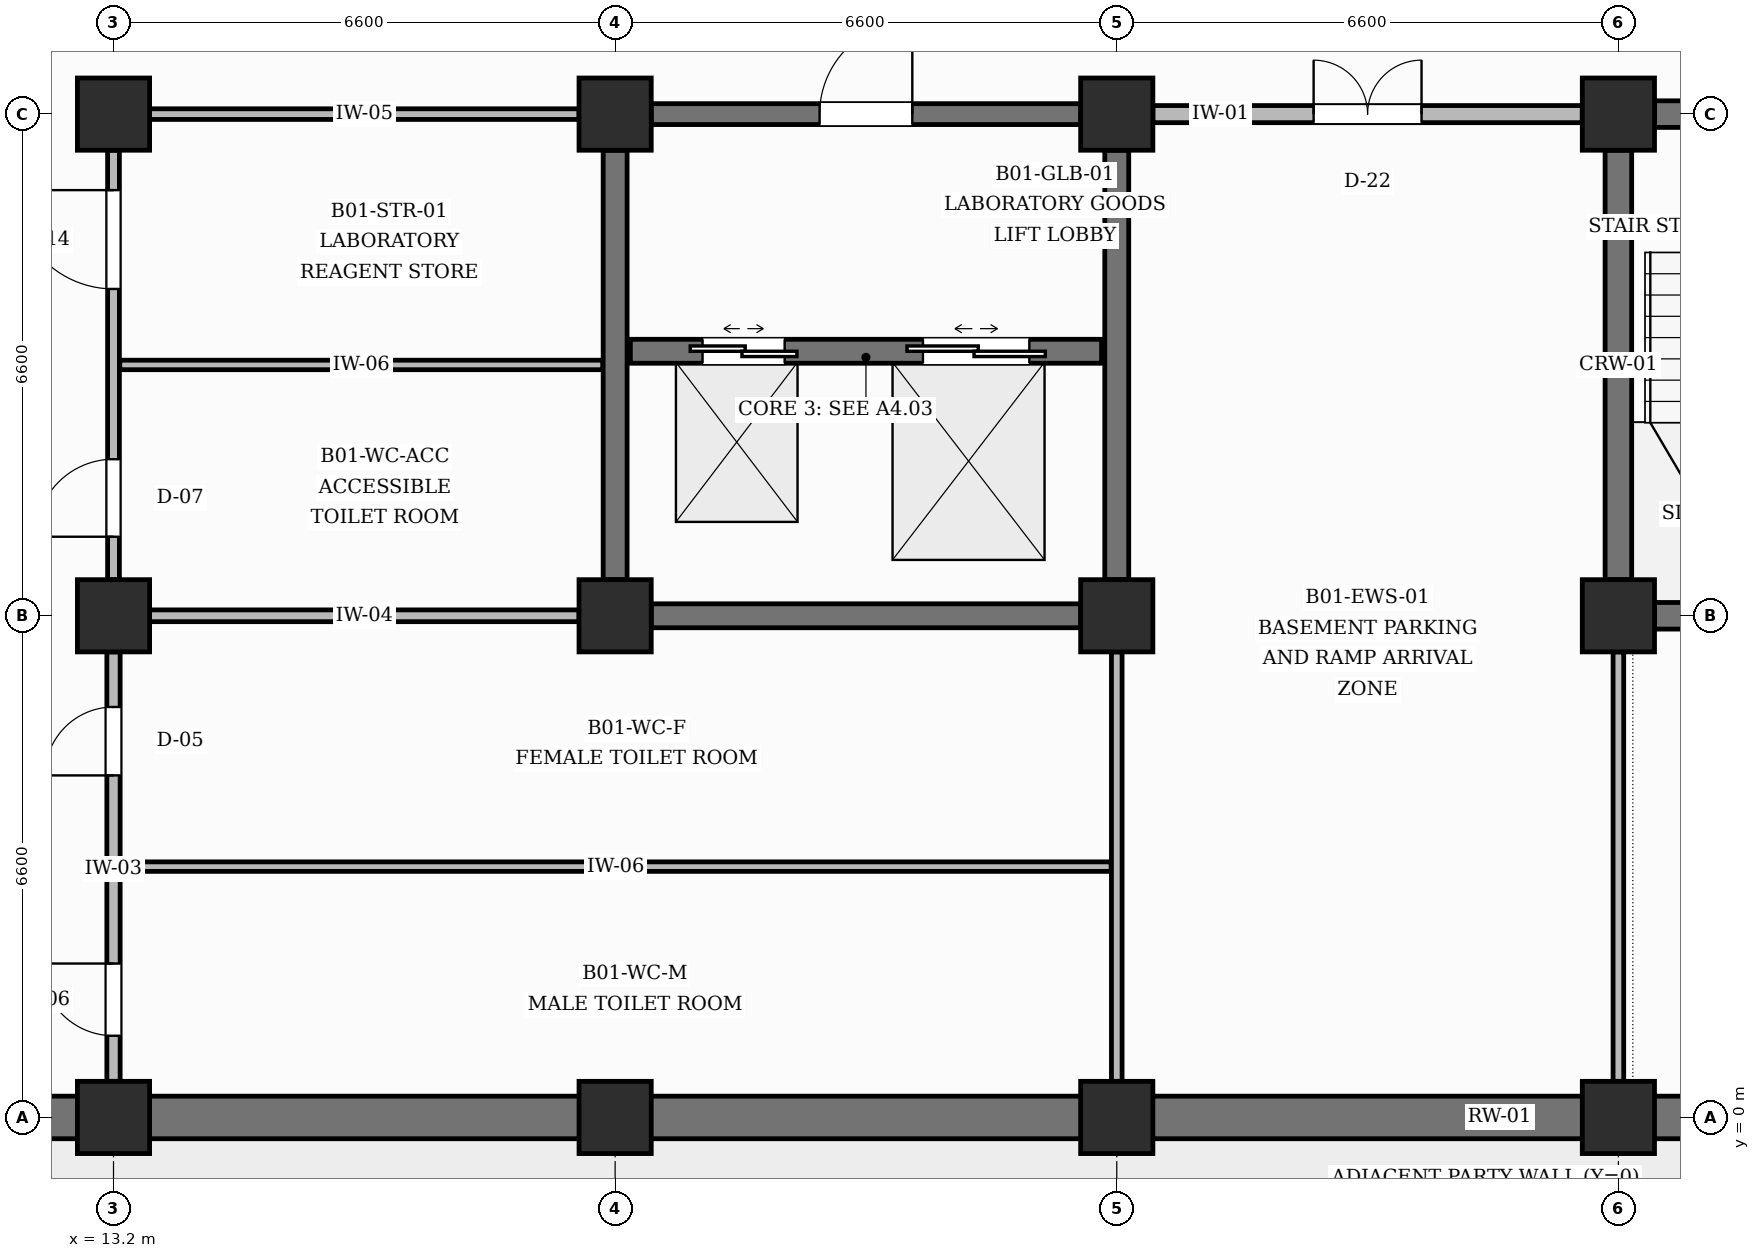
"""IFC4 building model, lengths in metres.
Left out: names, types, materials, properties, quantities, classifications, styles, units other than length and angle.
Written with IfcOpenShell. Run it as: python <this file> out.ifc"""

import sys

from ifc_helpers import new_model, si_unit, direction, frame, frame_2d, origin, origin_2d, place, context, subcontext, project, spatial, rectangle, extrude, element, fill, save


model = new_model("IFC4")
c1 = context("Model", 3, precision=1e-05, world=origin(), true_north=direction((0.0, 1.0)))
c2 = subcontext(c1, "Body", "Model", "MODEL_VIEW")
j1 = project(units=[si_unit("LENGTHUNIT", "METRE"), si_unit("PLANEANGLEUNIT", "RADIAN")], contexts=[c1])
p1 = place(None, origin())
s1 = spatial("IfcSite", under=j1, at=p1, CompositionType="ELEMENT")
p2 = place(p1, origin())
s2 = spatial("IfcBuilding", under=s1, at=p2, CompositionType="ELEMENT")
p3 = place(p2, frame((0.0, 0.0, -4.5)))
s3 = spatial("IfcBuildingStorey", under=s2, at=p3, CompositionType="ELEMENT", Elevation=-4.5)
for number, where, z_axis, x_axis in (
    (1, (13.2, 0.0, 0.0), (0.0, 0.0, 1.0), (1.0, 0.0, 0.0)),
    (2, (13.2, 6.6, 0.0), (0.0, 0.0, 1.0), (1.0, 0.0, 0.0)),
    (3, (13.2, 13.2, 0.0), (0.0, 0.0, 1.0), (1.0, 0.0, 0.0)),
    (4, (19.8, 0.0, 0.0), (0.0, 0.0, 1.0), (1.0, 0.0, 0.0)),
    (5, (19.8, 6.6, 0.0), (0.0, 0.0, 1.0), (1.0, 0.0, 0.0)),
    (6, (19.8, 13.2, 0.0), (0.0, 0.0, 1.0), (1.0, 0.0, 0.0)),
    (7, (26.4, 0.0, 0.0), (0.0, 0.0, 1.0), (1.0, 0.0, 0.0)),
    (8, (26.4, 6.6, 0.0), (0.0, 0.0, 1.0), (1.0, 0.0, 0.0)),
    (9, (26.4, 13.2, 0.0), (0.0, 0.0, 1.0), (1.0, 0.0, 0.0)),
    (10, (33.0, 0.0, 0.0), (0.0, 0.0, 1.0), (1.0, 0.0, 0.0)),
    (11, (33.0, 6.6, 0.0), (0.0, 0.0, 1.0), (1.0, 0.0, 0.0)),
    (12, (33.0, 13.2, 0.0), (0.0, 0.0, 1.0), (1.0, 0.0, 0.0)),
):
    element("IfcColumn", number, at=place(p3, frame(where, z_axis=z_axis, x_axis=x_axis)), inside=s3, PredefinedType="COLUMN", context=c2, shape_type="SweptSolid", body=[
        extrude(rectangle(XDim=0.95, YDim=0.95, at=origin_2d()), origin(), (0.0, 0.0, 1.0), 4.5),
    ])
p4 = place(p3, frame((7.075, 0.0, 0.0), z_axis=(0.0, 0.0, 1.0), x_axis=(1.0, 0.0, 0.0)))
e13 = element("IfcWall", 13, at=p4, inside=s3, PredefinedType="USERDEFINED", context=c2, shape_type="SweptSolid", body=[
    extrude(rectangle(XDim=5.65, YDim=0.56, at=frame_2d((2.825, 0.0))), origin(), (0.0, 0.0, 1.0), 3.49),
])
p5 = place(p3, frame((13.675, 0.0, 0.0), z_axis=(0.0, 0.0, 1.0), x_axis=(1.0, 0.0, 0.0)))
e14 = element("IfcWall", 14, at=p5, inside=s3, PredefinedType="USERDEFINED", context=c2, shape_type="SweptSolid", body=[
    extrude(rectangle(XDim=5.65, YDim=0.56, at=frame_2d((2.825, 0.0))), origin(), (0.0, 0.0, 1.0), 3.49),
])
p6 = place(p3, frame((20.275, 0.0, 0.0), z_axis=(0.0, 0.0, 1.0), x_axis=(1.0, 0.0, 0.0)))
e15 = element("IfcWall", 15, at=p6, inside=s3, PredefinedType="USERDEFINED", context=c2, shape_type="SweptSolid", body=[
    extrude(rectangle(XDim=5.65, YDim=0.56, at=frame_2d((2.825, 0.0))), origin(), (0.0, 0.0, 1.0), 3.49),
])
p7 = place(p3, frame((26.875, 0.0, 0.0), z_axis=(0.0, 0.0, 1.0), x_axis=(1.0, 0.0, 0.0)))
e16 = element("IfcWall", 16, at=p7, inside=s3, PredefinedType="USERDEFINED", context=c2, shape_type="SweptSolid", body=[
    extrude(rectangle(XDim=5.65, YDim=0.56, at=frame_2d((2.825, 0.0))), origin(), (0.0, 0.0, 1.0), 3.49),
])
p8 = place(p3, frame((33.475, 0.0, 0.0), z_axis=(0.0, 0.0, 1.0), x_axis=(1.0, 0.0, 0.0)))
e17 = element("IfcWall", 17, at=p8, inside=s3, PredefinedType="USERDEFINED", context=c2, shape_type="SweptSolid", body=[
    extrude(rectangle(XDim=5.675, YDim=0.56, at=frame_2d((2.837, 0.0))), origin(), (0.0, 0.0, 1.0), 3.49),
])
p9 = place(p3, frame((33.475, 6.6, 0.0), z_axis=(0.0, 0.0, 1.0), x_axis=(1.0, 0.0, 0.0)))
e18 = element("IfcWall", 18, at=p9, inside=s3, PredefinedType="SHEAR", context=c2, shape_type="SweptSolid", body=[
    extrude(rectangle(XDim=5.675, YDim=0.35, at=frame_2d((2.837, 0.0))), origin(), (0.0, 0.0, 1.0), 3.24),
])
p10 = place(p3, frame((33.475, 13.2, 0.0), z_axis=(0.0, 0.0, 1.0), x_axis=(1.0, 0.0, 0.0)))
e19 = element("IfcWall", 19, at=p10, inside=s3, PredefinedType="SHEAR", context=c2, shape_type="SweptSolid", body=[
    extrude(rectangle(XDim=5.675, YDim=0.35, at=frame_2d((2.837, 0.0))), origin(), (0.0, 0.0, 1.0), 3.34),
])
p11 = place(p10, frame((2.288, 0.0, 0.0)))
e20 = element("IfcOpeningElement", 20, at=p11, cuts=e19, PredefinedType="OPENING", context=c2, shape_type="SweptSolid", body=[
    extrude(rectangle(XDim=1.1, YDim=2.15, at=frame_2d((0.55, 1.075))), frame((0.0, 0.185, 0.0), z_axis=(0.0, -1.0, 0.0), x_axis=(1.0, 0.0, 0.0)), (0.0, 0.0, 1.0), 0.37),
])
p12 = place(p3, frame((33.0, 7.075, 0.0), z_axis=(0.0, 0.0, 1.0), x_axis=(0.0, 1.0, 0.0)))
e21 = element("IfcWall", 21, at=p12, inside=s3, PredefinedType="SHEAR", context=c2, shape_type="SweptSolid", body=[
    extrude(rectangle(XDim=5.65, YDim=0.35, at=frame_2d((2.825, 0.0))), origin(), (0.0, 0.0, 1.0), 3.34),
])
p13 = place(p3, frame((20.275, 6.6, 0.0), z_axis=(0.0, 0.0, 1.0), x_axis=(1.0, 0.0, 0.0)))
e22 = element("IfcWall", 22, at=p13, inside=s3, PredefinedType="SHEAR", context=c2, shape_type="SweptSolid", body=[
    extrude(rectangle(XDim=5.65, YDim=0.315, at=frame_2d((2.825, 0.0))), origin(), (0.0, 0.0, 1.0), 3.24),
])
for number, where, z_axis, x_axis in (
    (23, (19.8, 7.075, 0.0), (0.0, 0.0, 1.0), (0.0, 1.0, 0.0)),
    (24, (26.4, 7.075, 0.0), (0.0, 0.0, 1.0), (0.0, 1.0, 0.0)),
):
    element("IfcWall", number, at=place(p3, frame(where, z_axis=z_axis, x_axis=x_axis)), inside=s3, PredefinedType="SHEAR", context=c2, shape_type="SweptSolid", body=[
        extrude(rectangle(XDim=5.65, YDim=0.315, at=frame_2d((2.825, 0.0))), origin(), (0.0, 0.0, 1.0), 3.34),
    ])
p14 = place(p3, frame((20.275, 13.2, 0.0), z_axis=(0.0, 0.0, 1.0), x_axis=(1.0, 0.0, 0.0)))
e25 = element("IfcWall", 25, at=p14, inside=s3, PredefinedType="SHEAR", context=c2, shape_type="SweptSolid", body=[
    extrude(rectangle(XDim=5.65, YDim=0.275, at=frame_2d((2.825, 0.0))), origin(), (0.0, 0.0, 1.0), 3.34),
])
p15 = place(p14, frame((2.215, 0.0, 0.0)))
e26 = element("IfcOpeningElement", 26, at=p15, cuts=e25, PredefinedType="OPENING", context=c2, shape_type="SweptSolid", body=[
    extrude(rectangle(XDim=1.22, YDim=2.15, at=frame_2d((0.61, 1.075))), frame((0.0, 0.147, 0.0), z_axis=(0.0, -1.0, 0.0), x_axis=(1.0, 0.0, 0.0)), (0.0, 0.0, 1.0), 0.295),
])
p16 = place(p3, frame((20.0, 10.08, 0.0), z_axis=(0.0, 0.0, 1.0), x_axis=(1.0, 0.0, 0.0)))
e27 = element("IfcWall", 27, at=p16, inside=s3, PredefinedType="SHEAR", context=c2, shape_type="SweptSolid", body=[
    extrude(rectangle(XDim=6.2, YDim=0.315, at=frame_2d((3.1, 0.0))), origin(), (0.0, 0.0, 1.0), 4.09),
])
p17 = place(p16, frame((0.95, 0.0, 0.0)))
e28 = element("IfcOpeningElement", 28, at=p17, cuts=e27, PredefinedType="OPENING", context=c2, shape_type="SweptSolid", body=[
    extrude(rectangle(XDim=1.08, YDim=2.15, at=frame_2d((0.54, 1.075))), frame((0.0, 0.167, 0.0), z_axis=(0.0, -1.0, 0.0), x_axis=(1.0, 0.0, 0.0)), (0.0, 0.0, 1.0), 0.335),
])
p18 = place(p16, frame((3.85, 0.0, 0.0)))
e29 = element("IfcOpeningElement", 29, at=p18, cuts=e27, PredefinedType="OPENING", context=c2, shape_type="SweptSolid", body=[
    extrude(rectangle(XDim=1.4, YDim=2.35, at=frame_2d((0.7, 1.175))), frame((0.0, 0.167, 0.0), z_axis=(0.0, -1.0, 0.0), x_axis=(1.0, 0.0, 0.0)), (0.0, 0.0, 1.0), 0.335),
])
p19 = place(p3, frame((13.2, 0.475, 0.0), z_axis=(0.0, 0.0, 1.0), x_axis=(0.0, 1.0, 0.0)))
e30 = element("IfcWall", 30, at=p19, inside=s3, PredefinedType="PARTITIONING", context=c2, shape_type="SweptSolid", body=[
    extrude(rectangle(XDim=5.65, YDim=0.175, at=frame_2d((2.825, 0.0))), origin(), (0.0, 0.0, 1.0), 3.34),
])
p20 = place(p19, frame((0.6, 0.0, 0.0)))
e31 = element("IfcOpeningElement", 31, at=p20, cuts=e30, PredefinedType="OPENING", context=c2, shape_type="SweptSolid", body=[
    extrude(rectangle(XDim=0.95, YDim=2.1, at=frame_2d((0.475, 1.05))), frame((0.0, 0.097, 0.0), z_axis=(0.0, -1.0, 0.0), x_axis=(1.0, 0.0, 0.0)), (0.0, 0.0, 1.0), 0.195),
])
p21 = place(p19, frame((4.025, 0.0, 0.0)))
e32 = element("IfcOpeningElement", 32, at=p21, cuts=e30, PredefinedType="OPENING", context=c2, shape_type="SweptSolid", body=[
    extrude(rectangle(XDim=0.9, YDim=2.1, at=frame_2d((0.45, 1.05))), frame((0.0, 0.097, 0.0), z_axis=(0.0, -1.0, 0.0), x_axis=(1.0, 0.0, 0.0)), (0.0, 0.0, 1.0), 0.195),
])
p22 = place(p3, frame((26.4, 0.475, 0.0), z_axis=(0.0, 0.0, 1.0), x_axis=(0.0, 1.0, 0.0)))
e33 = element("IfcWall", 33, at=p22, inside=s3, PredefinedType="PARTITIONING", context=c2, shape_type="SweptSolid", body=[
    extrude(rectangle(XDim=5.65, YDim=0.14, at=frame_2d((2.825, 0.0))), origin(), (0.0, 0.0, 1.0), 3.34),
])
p23 = place(p3, frame((13.675, 6.6, 0.0), z_axis=(0.0, 0.0, 1.0), x_axis=(1.0, 0.0, 0.0)))
e34 = element("IfcWall", 34, at=p23, inside=s3, PredefinedType="PARTITIONING", context=c2, shape_type="SweptSolid", body=[
    extrude(rectangle(XDim=5.65, YDim=0.155, at=frame_2d((2.825, 0.0))), origin(), (0.0, 0.0, 1.0), 3.34),
])
p24 = place(p3, frame((13.2, 7.075, 0.0), z_axis=(0.0, 0.0, 1.0), x_axis=(0.0, 1.0, 0.0)))
e35 = element("IfcWall", 35, at=p24, inside=s3, PredefinedType="PARTITIONING", context=c2, shape_type="SweptSolid", body=[
    extrude(rectangle(XDim=5.65, YDim=0.155, at=frame_2d((2.825, 0.0))), origin(), (0.0, 0.0, 1.0), 3.34),
])
p25 = place(p24, frame((0.565, 0.0, 0.0)))
e36 = element("IfcOpeningElement", 36, at=p25, cuts=e35, PredefinedType="OPENING", context=c2, shape_type="SweptSolid", body=[
    extrude(rectangle(XDim=1.02, YDim=2.15, at=frame_2d((0.51, 1.075))), frame((0.0, 0.087, 0.0), z_axis=(0.0, -1.0, 0.0), x_axis=(1.0, 0.0, 0.0)), (0.0, 0.0, 1.0), 0.175),
])
p26 = place(p24, frame((3.825, 0.0, 0.0)))
e37 = element("IfcOpeningElement", 37, at=p26, cuts=e35, PredefinedType="OPENING", context=c2, shape_type="SweptSolid", body=[
    extrude(rectangle(XDim=1.3, YDim=2.3, at=frame_2d((0.65, 1.15))), frame((0.0, 0.087, 0.0), z_axis=(0.0, -1.0, 0.0), x_axis=(1.0, 0.0, 0.0)), (0.0, 0.0, 1.0), 0.175),
])
p27 = place(p3, frame((13.675, 13.2, 0.0), z_axis=(0.0, 0.0, 1.0), x_axis=(1.0, 0.0, 0.0)))
e38 = element("IfcWall", 38, at=p27, inside=s3, PredefinedType="PARTITIONING", context=c2, shape_type="SweptSolid", body=[
    extrude(rectangle(XDim=5.65, YDim=0.14, at=frame_2d((2.825, 0.0))), origin(), (0.0, 0.0, 1.0), 3.24),
])
p28 = place(p3, frame((33.0, 0.475, 0.0), z_axis=(0.0, 0.0, 1.0), x_axis=(0.0, 1.0, 0.0)))
e39 = element("IfcWall", 39, at=p28, inside=s3, PredefinedType="PARTITIONING", context=c2, shape_type="SweptSolid", body=[
    extrude(rectangle(XDim=5.65, YDim=0.14, at=frame_2d((2.825, 0.0))), origin(), (0.0, 0.0, 1.0), 3.34),
])
p29 = place(p3, frame((26.875, 13.2, 0.0), z_axis=(0.0, 0.0, 1.0), x_axis=(1.0, 0.0, 0.0)))
e40 = element("IfcWall", 40, at=p29, inside=s3, PredefinedType="PARTITIONING", context=c2, shape_type="SweptSolid", body=[
    extrude(rectangle(XDim=5.65, YDim=0.225, at=frame_2d((2.825, 0.0))), origin(), (0.0, 0.0, 1.0), 3.24),
])
p30 = place(p29, frame((2.115, 0.0, 0.0)))
e41 = element("IfcOpeningElement", 41, at=p30, cuts=e40, PredefinedType="OPENING", context=c2, shape_type="SweptSolid", body=[
    extrude(rectangle(XDim=1.42, YDim=2.2, at=frame_2d((0.71, 1.1))), frame((0.0, 0.123, 0.0), z_axis=(0.0, -1.0, 0.0), x_axis=(1.0, 0.0, 0.0)), (0.0, 0.0, 1.0), 0.245),
])
p31 = place(p3, frame((13.292, 3.3, 0.0), z_axis=(0.0, 0.0, 1.0), x_axis=(1.0, 0.0, 0.0)))
e42 = element("IfcWall", 42, at=p31, inside=s3, PredefinedType="PARTITIONING", context=c2, shape_type="SweptSolid", body=[
    extrude(rectangle(XDim=13.032, YDim=0.125, at=frame_2d((6.516, 0.0))), origin(), (0.0, 0.0, 1.0), 4.09),
])
p32 = place(p3, frame((13.282, 9.9, 0.0), z_axis=(0.0, 0.0, 1.0), x_axis=(1.0, 0.0, 0.0)))
e43 = element("IfcWall", 43, at=p32, inside=s3, PredefinedType="PARTITIONING", context=c2, shape_type="SweptSolid", body=[
    extrude(rectangle(XDim=6.355, YDim=0.125, at=frame_2d((3.177, 0.0))), origin(), (0.0, 0.0, 1.0), 4.09),
])
p33 = place(p17, origin())
e44 = element("IfcDoor", 44, at=p33, inside=s3, OperationType="DOUBLE_DOOR_SLIDING", PredefinedType="USERDEFINED", context=c2, shape_type="SweptSolid", body=[
    extrude(rectangle(XDim=1.08, YDim=2.15, at=frame_2d((0.54, 1.075))), frame((0.0, 0.025, 0.0), z_axis=(0.0, -1.0, 0.0), x_axis=(1.0, 0.0, 0.0)), (0.0, 0.0, 1.0), 0.05),
])
fill(e28, e44)
p34 = place(p18, origin())
e45 = element("IfcDoor", 45, at=p34, inside=s3, OperationType="DOUBLE_DOOR_SLIDING", PredefinedType="USERDEFINED", context=c2, shape_type="SweptSolid", body=[
    extrude(rectangle(XDim=1.4, YDim=2.35, at=frame_2d((0.7, 1.175))), frame((0.0, 0.025, 0.0), z_axis=(0.0, -1.0, 0.0), x_axis=(1.0, 0.0, 0.0)), (0.0, 0.0, 1.0), 0.05),
])
fill(e29, e45)
p35 = place(p15, origin())
e46 = element("IfcDoor", 46, at=p35, inside=s3, OperationType="SINGLE_SWING_RIGHT", PredefinedType="DOOR", context=c2, shape_type="SweptSolid", body=[
    extrude(rectangle(XDim=1.22, YDim=2.15, at=frame_2d((0.61, 1.075))), frame((0.0, 0.025, 0.0), z_axis=(0.0, -1.0, 0.0), x_axis=(1.0, 0.0, 0.0)), (0.0, 0.0, 1.0), 0.05),
])
fill(e26, e46)
p36 = place(p20, origin())
e47 = element("IfcDoor", 47, at=p36, inside=s3, OperationType="SINGLE_SWING_RIGHT", PredefinedType="DOOR", context=c2, shape_type="SweptSolid", body=[
    extrude(rectangle(XDim=0.95, YDim=2.1, at=frame_2d((0.475, 1.05))), frame((0.0, 0.025, 0.0), z_axis=(0.0, -1.0, 0.0), x_axis=(1.0, 0.0, 0.0)), (0.0, 0.0, 1.0), 0.05),
])
fill(e31, e47)
p37 = place(p21, origin())
e48 = element("IfcDoor", 48, at=p37, inside=s3, OperationType="SINGLE_SWING_LEFT", PredefinedType="DOOR", context=c2, shape_type="SweptSolid", body=[
    extrude(rectangle(XDim=0.9, YDim=2.1, at=frame_2d((0.45, 1.05))), frame((0.0, 0.025, 0.0), z_axis=(0.0, -1.0, 0.0), x_axis=(1.0, 0.0, 0.0)), (0.0, 0.0, 1.0), 0.05),
])
fill(e32, e48)
p38 = place(p25, origin())
e49 = element("IfcDoor", 49, at=p38, inside=s3, OperationType="SINGLE_SWING_LEFT", PredefinedType="DOOR", context=c2, shape_type="SweptSolid", body=[
    extrude(rectangle(XDim=1.02, YDim=2.15, at=frame_2d((0.51, 1.075))), frame((0.0, 0.025, 0.0), z_axis=(0.0, -1.0, 0.0), x_axis=(1.0, 0.0, 0.0)), (0.0, 0.0, 1.0), 0.05),
])
fill(e36, e49)
p39 = place(p26, origin())
e50 = element("IfcDoor", 50, at=p39, inside=s3, OperationType="SINGLE_SWING_RIGHT", PredefinedType="DOOR", context=c2, shape_type="SweptSolid", body=[
    extrude(rectangle(XDim=1.3, YDim=2.3, at=frame_2d((0.65, 1.15))), frame((0.0, 0.025, 0.0), z_axis=(0.0, -1.0, 0.0), x_axis=(1.0, 0.0, 0.0)), (0.0, 0.0, 1.0), 0.05),
])
fill(e37, e50)
p40 = place(p30, origin())
e51 = element("IfcDoor", 51, at=p40, inside=s3, OperationType="DOUBLE_DOOR_SINGLE_SWING", PredefinedType="DOOR", context=c2, shape_type="SweptSolid", body=[
    extrude(rectangle(XDim=1.42, YDim=2.2, at=frame_2d((0.71, 1.1))), frame((0.0, 0.025, 0.0), z_axis=(0.0, -1.0, 0.0), x_axis=(1.0, 0.0, 0.0)), (0.0, 0.0, 1.0), 0.05),
])
fill(e41, e51)
save(model, sys.argv[1])
